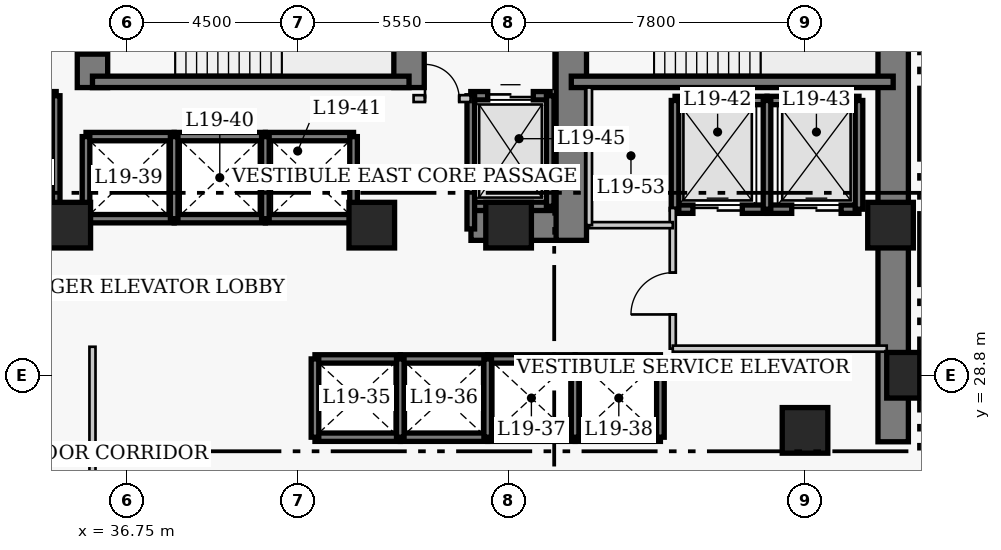
"""IFC4 building model, lengths in metres.
Left out: names, types, materials, properties, quantities, classifications, styles, units other than length and angle.
Written with IfcOpenShell. Run it as: python <this file> out.ifc"""

import sys

from ifc_helpers import new_model, si_unit, direction, frame, frame_2d, origin, origin_2d, place, context, subcontext, project, spatial, rectangle, extrude, element, fill, save


model = new_model("IFC4")
c1 = context("Model", 3, precision=1e-05, world=origin(), true_north=direction((0.0, 1.0)))
c2 = subcontext(c1, "Body", "Model", "MODEL_VIEW")
j1 = project(units=[si_unit("LENGTHUNIT", "METRE"), si_unit("PLANEANGLEUNIT", "RADIAN")], contexts=[c1])
p1 = place(None, origin())
s1 = spatial("IfcSite", under=j1, at=p1, CompositionType="ELEMENT")
p2 = place(p1, origin())
s2 = spatial("IfcBuilding", under=s1, at=p2, CompositionType="ELEMENT")
p3 = place(p2, frame((0.0, 0.0, 80.4)))
s3 = spatial("IfcBuildingStorey", under=s2, at=p3, CompositionType="ELEMENT", Elevation=80.4)
p4 = place(p3, frame((56.92, 27.05, 0.0), z_axis=(0.0, 0.0, 1.0), x_axis=(0.0, 1.0, 0.0)))
e1 = element("IfcWall", 1, at=p4, inside=s3, PredefinedType="SHEAR", context=c2, shape_type="SweptSolid", body=[
    extrude(rectangle(XDim=13.67, YDim=0.8, at=frame_2d((6.835, 0.0))), origin(), (0.0, 0.0, 1.0), 3.8),
])
p5 = place(p3, frame((45.81, 32.75, 0.0), z_axis=(0.0, 0.0, 1.0), x_axis=(1.0, 0.0, 0.0)))
e2 = element("IfcWall", 2, at=p5, inside=s3, PredefinedType="SHEAR", context=c2, shape_type="SweptSolid", body=[
    extrude(rectangle(XDim=2.64, YDim=0.8, at=frame_2d((1.32, 0.0))), origin(), (0.0, 0.0, 1.0), 3.8),
])
p6 = place(p3, frame((35.85, 36.37, 0.0), z_axis=(0.0, 0.0, 1.0), x_axis=(0.0, 1.0, 0.0)))
e3 = element("IfcWall", 3, at=p6, inside=s3, PredefinedType="SHEAR", context=c2, shape_type="SweptSolid", body=[
    extrude(rectangle(XDim=3.95, YDim=0.8, at=frame_2d((1.975, 0.0))), origin(), (0.0, 0.0, 1.0), 3.8),
])
p7 = place(p6, frame((0.88, 0.0, 0.0)))
e4 = element("IfcOpeningElement", 4, at=p7, cuts=e3, PredefinedType="OPENING", context=c2, shape_type="SweptSolid", body=[
    extrude(rectangle(XDim=1.1, YDim=2.15, at=frame_2d((0.55, 1.075))), frame((0.0, 0.41, 0.0), z_axis=(0.0, -1.0, 0.0), x_axis=(1.0, 0.0, 0.0)), (0.0, 0.0, 1.0), 0.82),
])
p8 = place(p3, frame((44.18, 36.37, 0.0), z_axis=(0.0, 0.0, 1.0), x_axis=(0.0, 1.0, 0.0)))
e5 = element("IfcWall", 5, at=p8, inside=s3, PredefinedType="SHEAR", context=c2, shape_type="SweptSolid", body=[
    extrude(rectangle(XDim=3.95, YDim=0.8, at=frame_2d((1.975, 0.0))), origin(), (0.0, 0.0, 1.0), 3.8),
])
p9 = place(p3, frame((48.45, 32.35, 0.0), z_axis=(0.0, 0.0, 1.0), x_axis=(0.0, 1.0, 0.0)))
e6 = element("IfcWall", 6, at=p9, inside=s3, PredefinedType="SHEAR", context=c2, shape_type="SweptSolid", body=[
    extrude(rectangle(XDim=7.97, YDim=0.8, at=frame_2d((3.985, 0.0))), origin(), (0.0, 0.0, 1.0), 3.8),
])
p10 = place(p9, frame((5.85, 0.0, 0.0)))
e7 = element("IfcOpeningElement", 7, at=p10, cuts=e6, PredefinedType="OPENING", context=c2, shape_type="SweptSolid", body=[
    extrude(rectangle(XDim=1.1, YDim=2.15, at=frame_2d((0.55, 1.075))), frame((0.0, 0.41, 0.0), z_axis=(0.0, -1.0, 0.0), x_axis=(1.0, 0.0, 0.0)), (0.0, 0.0, 1.0), 0.82),
])
p11 = place(p3, frame((35.85, 36.52, 0.0), z_axis=(0.0, 0.0, 1.0), x_axis=(1.0, 0.0, 0.0)))
e8 = element("IfcWall", 8, at=p11, inside=s3, PredefinedType="SHEAR", context=c2, shape_type="SweptSolid", body=[
    extrude(rectangle(XDim=8.33, YDim=0.3, at=frame_2d((4.165, 0.0))), origin(), (0.0, 0.0, 1.0), 3.8),
])
p12 = place(p3, frame((48.45, 36.52, 0.0), z_axis=(0.0, 0.0, 1.0), x_axis=(1.0, 0.0, 0.0)))
e9 = element("IfcWall", 9, at=p12, inside=s3, PredefinedType="SHEAR", context=c2, shape_type="SweptSolid", body=[
    extrude(rectangle(XDim=8.47, YDim=0.3, at=frame_2d((4.235, 0.0))), origin(), (0.0, 0.0, 1.0), 3.8),
])
for number, where, z_axis, x_axis in (
    (10, (57.35, 28.8, 0.0), (0.0, 0.0, 1.0), (1.0, 0.0, 0.0)),
    (11, (35.2, 32.75, 0.0), (0.0, 0.0, 1.0), (1.0, 0.0, 0.0)),
    (12, (43.2, 32.75, 0.0), (0.0, 0.0, 1.0), (1.0, 0.0, 0.0)),
    (13, (46.8, 32.75, 0.0), (0.0, 0.0, 1.0), (1.0, 0.0, 0.0)),
    (14, (54.6, 27.35, 0.0), (0.0, 0.0, 1.0), (1.0, 0.0, 0.0)),
    (15, (56.85, 32.75, 0.0), (0.0, 0.0, 1.0), (1.0, 0.0, 0.0)),
):
    element("IfcColumn", number, at=place(p3, frame(where, z_axis=z_axis, x_axis=x_axis)), inside=s3, PredefinedType="COLUMN", context=c2, shape_type="SweptSolid", body=[
        extrude(rectangle(XDim=1.2, YDim=1.2, at=origin_2d()), origin(), (0.0, 0.0, 1.0), 3.8),
    ])
for number, where, z_axis, x_axis in (
    (16, (41.705, 29.23, 0.0), (0.0, 0.0, 1.0), (1.0, 0.0, 0.0)),
    (17, (41.705, 27.17, 0.0), (0.0, 0.0, 1.0), (1.0, 0.0, 0.0)),
):
    element("IfcWall", number, at=place(p3, frame(where, z_axis=z_axis, x_axis=x_axis)), inside=s3, PredefinedType="SHEAR", context=c2, shape_type="SweptSolid", body=[
        extrude(rectangle(XDim=2.245, YDim=0.22, at=frame_2d((1.123, 0.0))), origin(), (0.0, 0.0, 1.0), 3.8),
    ])
p13 = place(p3, frame((41.705, 27.17, 0.0), z_axis=(0.0, 0.0, 1.0), x_axis=(0.0, 1.0, 0.0)))
e18 = element("IfcWall", 18, at=p13, inside=s3, PredefinedType="SHEAR", context=c2, shape_type="SweptSolid", body=[
    extrude(rectangle(XDim=2.06, YDim=0.2, at=frame_2d((1.03, 0.0))), origin(), (0.0, 0.0, 1.0), 3.8),
])
for number, where, z_axis, x_axis in (
    (19, (43.95, 29.23, 0.0), (0.0, 0.0, 1.0), (1.0, 0.0, 0.0)),
    (20, (43.95, 27.17, 0.0), (0.0, 0.0, 1.0), (1.0, 0.0, 0.0)),
):
    element("IfcWall", number, at=place(p3, frame(where, z_axis=z_axis, x_axis=x_axis)), inside=s3, PredefinedType="SHEAR", context=c2, shape_type="SweptSolid", body=[
        extrude(rectangle(XDim=2.3, YDim=0.22, at=frame_2d((1.15, 0.0))), origin(), (0.0, 0.0, 1.0), 3.8),
    ])
p14 = place(p3, frame((43.95, 27.17, 0.0), z_axis=(0.0, 0.0, 1.0), x_axis=(0.0, 1.0, 0.0)))
e21 = element("IfcWall", 21, at=p14, inside=s3, PredefinedType="SHEAR", context=c2, shape_type="SweptSolid", body=[
    extrude(rectangle(XDim=2.06, YDim=0.2, at=frame_2d((1.03, 0.0))), origin(), (0.0, 0.0, 1.0), 3.8),
])
for number, where, z_axis, x_axis in (
    (22, (46.25, 29.23, 0.0), (0.0, 0.0, 1.0), (1.0, 0.0, 0.0)),
    (23, (46.25, 27.17, 0.0), (0.0, 0.0, 1.0), (1.0, 0.0, 0.0)),
):
    element("IfcWall", number, at=place(p3, frame(where, z_axis=z_axis, x_axis=x_axis)), inside=s3, PredefinedType="SHEAR", context=c2, shape_type="SweptSolid", body=[
        extrude(rectangle(XDim=2.3, YDim=0.22, at=frame_2d((1.15, 0.0))), origin(), (0.0, 0.0, 1.0), 3.8),
    ])
p15 = place(p3, frame((46.25, 27.17, 0.0), z_axis=(0.0, 0.0, 1.0), x_axis=(0.0, 1.0, 0.0)))
e24 = element("IfcWall", 24, at=p15, inside=s3, PredefinedType="SHEAR", context=c2, shape_type="SweptSolid", body=[
    extrude(rectangle(XDim=2.06, YDim=0.2, at=frame_2d((1.03, 0.0))), origin(), (0.0, 0.0, 1.0), 3.8),
])
for number, where, z_axis, x_axis in (
    (25, (48.55, 29.23, 0.0), (0.0, 0.0, 1.0), (1.0, 0.0, 0.0)),
    (26, (48.55, 27.17, 0.0), (0.0, 0.0, 1.0), (1.0, 0.0, 0.0)),
):
    element("IfcWall", number, at=place(p3, frame(where, z_axis=z_axis, x_axis=x_axis)), inside=s3, PredefinedType="SHEAR", context=c2, shape_type="SweptSolid", body=[
        extrude(rectangle(XDim=2.245, YDim=0.22, at=frame_2d((1.123, 0.0))), origin(), (0.0, 0.0, 1.0), 3.8),
    ])
for number, where, z_axis, x_axis in (
    (27, (48.55, 27.17, 0.0), (0.0, 0.0, 1.0), (0.0, 1.0, 0.0)),
    (28, (50.795, 27.17, 0.0), (0.0, 0.0, 1.0), (0.0, 1.0, 0.0)),
):
    element("IfcWall", number, at=place(p3, frame(where, z_axis=z_axis, x_axis=x_axis)), inside=s3, PredefinedType="SHEAR", context=c2, shape_type="SweptSolid", body=[
        extrude(rectangle(XDim=2.06, YDim=0.2, at=frame_2d((1.03, 0.0))), origin(), (0.0, 0.0, 1.0), 3.8),
    ])
for number, where, z_axis, x_axis in (
    (29, (35.68, 35.08, 0.0), (0.0, 0.0, 1.0), (1.0, 0.0, 0.0)),
    (30, (35.68, 32.92, 0.0), (0.0, 0.0, 1.0), (1.0, 0.0, 0.0)),
):
    element("IfcWall", number, at=place(p3, frame(where, z_axis=z_axis, x_axis=x_axis)), inside=s3, PredefinedType="SHEAR", context=c2, shape_type="SweptSolid", body=[
        extrude(rectangle(XDim=2.32, YDim=0.22, at=frame_2d((1.16, 0.0))), origin(), (0.0, 0.0, 1.0), 3.8),
    ])
p16 = place(p3, frame((35.68, 32.92, 0.0), z_axis=(0.0, 0.0, 1.0), x_axis=(0.0, 1.0, 0.0)))
e31 = element("IfcWall", 31, at=p16, inside=s3, PredefinedType="SHEAR", context=c2, shape_type="SweptSolid", body=[
    extrude(rectangle(XDim=2.16, YDim=0.2, at=frame_2d((1.08, 0.0))), origin(), (0.0, 0.0, 1.0), 3.8),
])
for number, where, z_axis, x_axis in (
    (32, (38.0, 35.08, 0.0), (0.0, 0.0, 1.0), (1.0, 0.0, 0.0)),
    (33, (38.0, 32.92, 0.0), (0.0, 0.0, 1.0), (1.0, 0.0, 0.0)),
):
    element("IfcWall", number, at=place(p3, frame(where, z_axis=z_axis, x_axis=x_axis)), inside=s3, PredefinedType="SHEAR", context=c2, shape_type="SweptSolid", body=[
        extrude(rectangle(XDim=2.4, YDim=0.22, at=frame_2d((1.2, 0.0))), origin(), (0.0, 0.0, 1.0), 3.8),
    ])
p17 = place(p3, frame((38.0, 32.92, 0.0), z_axis=(0.0, 0.0, 1.0), x_axis=(0.0, 1.0, 0.0)))
e34 = element("IfcWall", 34, at=p17, inside=s3, PredefinedType="SHEAR", context=c2, shape_type="SweptSolid", body=[
    extrude(rectangle(XDim=2.16, YDim=0.2, at=frame_2d((1.08, 0.0))), origin(), (0.0, 0.0, 1.0), 3.8),
])
for number, where, z_axis, x_axis in (
    (35, (40.4, 35.08, 0.0), (0.0, 0.0, 1.0), (1.0, 0.0, 0.0)),
    (36, (40.4, 32.92, 0.0), (0.0, 0.0, 1.0), (1.0, 0.0, 0.0)),
):
    element("IfcWall", number, at=place(p3, frame(where, z_axis=z_axis, x_axis=x_axis)), inside=s3, PredefinedType="SHEAR", context=c2, shape_type="SweptSolid", body=[
        extrude(rectangle(XDim=2.32, YDim=0.22, at=frame_2d((1.16, 0.0))), origin(), (0.0, 0.0, 1.0), 3.8),
    ])
for number, where, z_axis, x_axis in (
    (37, (40.4, 32.92, 0.0), (0.0, 0.0, 1.0), (0.0, 1.0, 0.0)),
    (38, (42.72, 32.92, 0.0), (0.0, 0.0, 1.0), (0.0, 1.0, 0.0)),
):
    element("IfcWall", number, at=place(p3, frame(where, z_axis=z_axis, x_axis=x_axis)), inside=s3, PredefinedType="SHEAR", context=c2, shape_type="SweptSolid", body=[
        extrude(rectangle(XDim=2.16, YDim=0.2, at=frame_2d((1.08, 0.0))), origin(), (0.0, 0.0, 1.0), 3.8),
    ])
p18 = place(p3, frame((51.18, 36.03, 0.0), z_axis=(0.0, 0.0, 1.0), x_axis=(1.0, 0.0, 0.0)))
e39 = element("IfcWall", 39, at=p18, inside=s3, PredefinedType="SHEAR", context=c2, shape_type="SweptSolid", body=[
    extrude(rectangle(XDim=2.42, YDim=0.22, at=frame_2d((1.21, 0.0))), origin(), (0.0, 0.0, 1.0), 3.8),
])
p19 = place(p3, frame((51.18, 33.17, 0.0), z_axis=(0.0, 0.0, 1.0), x_axis=(1.0, 0.0, 0.0)))
e40 = element("IfcWall", 40, at=p19, inside=s3, PredefinedType="SHEAR", context=c2, shape_type="SweptSolid", body=[
    extrude(rectangle(XDim=2.42, YDim=0.22, at=frame_2d((1.21, 0.0))), origin(), (0.0, 0.0, 1.0), 3.8),
])
p20 = place(p19, frame((0.47, 0.0, 0.0)))
e41 = element("IfcOpeningElement", 41, at=p20, cuts=e40, PredefinedType="OPENING", context=c2, shape_type="SweptSolid", body=[
    extrude(rectangle(XDim=1.3, YDim=2.15, at=frame_2d((0.65, 1.075))), frame((0.0, 0.12, 0.0), z_axis=(0.0, -1.0, 0.0), x_axis=(1.0, 0.0, 0.0)), (0.0, 0.0, 1.0), 0.24),
])
p21 = place(p3, frame((51.18, 33.17, 0.0), z_axis=(0.0, 0.0, 1.0), x_axis=(0.0, 1.0, 0.0)))
e42 = element("IfcWall", 42, at=p21, inside=s3, PredefinedType="SHEAR", context=c2, shape_type="SweptSolid", body=[
    extrude(rectangle(XDim=2.86, YDim=0.2, at=frame_2d((1.43, 0.0))), origin(), (0.0, 0.0, 1.0), 3.8),
])
p22 = place(p3, frame((53.6, 36.03, 0.0), z_axis=(0.0, 0.0, 1.0), x_axis=(1.0, 0.0, 0.0)))
e43 = element("IfcWall", 43, at=p22, inside=s3, PredefinedType="SHEAR", context=c2, shape_type="SweptSolid", body=[
    extrude(rectangle(XDim=2.42, YDim=0.22, at=frame_2d((1.21, 0.0))), origin(), (0.0, 0.0, 1.0), 3.8),
])
p23 = place(p3, frame((53.6, 33.17, 0.0), z_axis=(0.0, 0.0, 1.0), x_axis=(1.0, 0.0, 0.0)))
e44 = element("IfcWall", 44, at=p23, inside=s3, PredefinedType="SHEAR", context=c2, shape_type="SweptSolid", body=[
    extrude(rectangle(XDim=2.42, YDim=0.22, at=frame_2d((1.21, 0.0))), origin(), (0.0, 0.0, 1.0), 3.8),
])
p24 = place(p23, frame((0.65, 0.0, 0.0)))
e45 = element("IfcOpeningElement", 45, at=p24, cuts=e44, PredefinedType="OPENING", context=c2, shape_type="SweptSolid", body=[
    extrude(rectangle(XDim=1.3, YDim=2.15, at=frame_2d((0.65, 1.075))), frame((0.0, 0.12, 0.0), z_axis=(0.0, -1.0, 0.0), x_axis=(1.0, 0.0, 0.0)), (0.0, 0.0, 1.0), 0.24),
])
for number, where, z_axis, x_axis in (
    (46, (53.6, 33.17, 0.0), (0.0, 0.0, 1.0), (0.0, 1.0, 0.0)),
    (47, (56.02, 33.17, 0.0), (0.0, 0.0, 1.0), (0.0, 1.0, 0.0)),
):
    element("IfcWall", number, at=place(p3, frame(where, z_axis=z_axis, x_axis=x_axis)), inside=s3, PredefinedType="SHEAR", context=c2, shape_type="SweptSolid", body=[
        extrude(rectangle(XDim=2.86, YDim=0.2, at=frame_2d((1.43, 0.0))), origin(), (0.0, 0.0, 1.0), 3.8),
    ])
p25 = place(p3, frame((32.805, 36.155, 0.0), z_axis=(0.0, 0.0, 1.0), x_axis=(1.0, 0.0, 0.0)))
e48 = element("IfcWall", 48, at=p25, inside=s3, PredefinedType="SHEAR", context=c2, shape_type="SweptSolid", body=[
    extrude(rectangle(XDim=2.09, YDim=0.22, at=frame_2d((1.045, 0.0))), origin(), (0.0, 0.0, 1.0), 3.8),
])
p26 = place(p25, frame((0.445, 0.0, 0.0)))
e49 = element("IfcOpeningElement", 49, at=p26, cuts=e48, PredefinedType="OPENING", context=c2, shape_type="SweptSolid", body=[
    extrude(rectangle(XDim=1.2, YDim=2.15, at=frame_2d((0.6, 1.075))), frame((0.0, 0.12, 0.0), z_axis=(0.0, -1.0, 0.0), x_axis=(1.0, 0.0, 0.0)), (0.0, 0.0, 1.0), 0.24),
])
p27 = place(p3, frame((32.805, 33.245, 0.0), z_axis=(0.0, 0.0, 1.0), x_axis=(1.0, 0.0, 0.0)))
e50 = element("IfcWall", 50, at=p27, inside=s3, PredefinedType="SHEAR", context=c2, shape_type="SweptSolid", body=[
    extrude(rectangle(XDim=2.09, YDim=0.22, at=frame_2d((1.045, 0.0))), origin(), (0.0, 0.0, 1.0), 3.8),
])
p28 = place(p3, frame((34.895, 33.245, 0.0), z_axis=(0.0, 0.0, 1.0), x_axis=(0.0, 1.0, 0.0)))
e51 = element("IfcWall", 51, at=p28, inside=s3, PredefinedType="SHEAR", context=c2, shape_type="SweptSolid", body=[
    extrude(rectangle(XDim=2.91, YDim=0.2, at=frame_2d((1.455, 0.0))), origin(), (0.0, 0.0, 1.0), 3.8),
])
p29 = place(p3, frame((45.805, 36.155, 0.0), z_axis=(0.0, 0.0, 1.0), x_axis=(1.0, 0.0, 0.0)))
e52 = element("IfcWall", 52, at=p29, inside=s3, PredefinedType="SHEAR", context=c2, shape_type="SweptSolid", body=[
    extrude(rectangle(XDim=2.09, YDim=0.22, at=frame_2d((1.045, 0.0))), origin(), (0.0, 0.0, 1.0), 3.8),
])
p30 = place(p29, frame((0.445, 0.0, 0.0)))
e53 = element("IfcOpeningElement", 53, at=p30, cuts=e52, PredefinedType="OPENING", context=c2, shape_type="SweptSolid", body=[
    extrude(rectangle(XDim=1.2, YDim=2.15, at=frame_2d((0.6, 1.075))), frame((0.0, 0.12, 0.0), z_axis=(0.0, -1.0, 0.0), x_axis=(1.0, 0.0, 0.0)), (0.0, 0.0, 1.0), 0.24),
])
p31 = place(p3, frame((45.805, 33.245, 0.0), z_axis=(0.0, 0.0, 1.0), x_axis=(1.0, 0.0, 0.0)))
e54 = element("IfcWall", 54, at=p31, inside=s3, PredefinedType="SHEAR", context=c2, shape_type="SweptSolid", body=[
    extrude(rectangle(XDim=2.09, YDim=0.22, at=frame_2d((1.045, 0.0))), origin(), (0.0, 0.0, 1.0), 3.8),
])
p32 = place(p3, frame((45.805, 32.65, 0.0), z_axis=(0.0, 0.0, 1.0), x_axis=(0.0, 1.0, 0.0)))
e55 = element("IfcWall", 55, at=p32, inside=s3, PredefinedType="SHEAR", context=c2, shape_type="SweptSolid", body=[
    extrude(rectangle(XDim=3.505, YDim=0.2, at=frame_2d((1.752, 0.0))), origin(), (0.0, 0.0, 1.0), 3.8),
])
p33 = place(p3, frame((47.895, 33.245, 0.0), z_axis=(0.0, 0.0, 1.0), x_axis=(0.0, 1.0, 0.0)))
e56 = element("IfcWall", 56, at=p33, inside=s3, PredefinedType="SHEAR", context=c2, shape_type="SweptSolid", body=[
    extrude(rectangle(XDim=2.91, YDim=0.2, at=frame_2d((1.455, 0.0))), origin(), (0.0, 0.0, 1.0), 3.8),
])
p34 = place(p3, frame((44.3, 36.08, 0.0), z_axis=(0.0, 0.0, 1.0), x_axis=(1.0, 0.0, 0.0)))
e57 = element("IfcWall", 57, at=p34, inside=s3, PredefinedType="PARTITIONING", context=c2, shape_type="SweptSolid", body=[
    extrude(rectangle(XDim=1.5, YDim=0.18, at=frame_2d((0.75, 0.0))), origin(), (0.0, 0.0, 1.0), 3.54),
])
p35 = place(p34, frame((0.3, 0.0, 0.0)))
e58 = element("IfcOpeningElement", 58, at=p35, cuts=e57, PredefinedType="OPENING", context=c2, shape_type="SweptSolid", body=[
    extrude(rectangle(XDim=0.9, YDim=2.15, at=frame_2d((0.45, 1.075))), frame((0.0, 0.1, 0.0), z_axis=(0.0, -1.0, 0.0), x_axis=(1.0, 0.0, 0.0)), (0.0, 0.0, 1.0), 0.2),
])
p36 = place(p3, frame((51.12, 29.5, 0.0), z_axis=(0.0, 0.0, 1.0), x_axis=(0.0, 1.0, 0.0)))
e59 = element("IfcWall", 59, at=p36, inside=s3, PredefinedType="PARTITIONING", context=c2, shape_type="SweptSolid", body=[
    extrude(rectangle(XDim=3.7, YDim=0.16, at=frame_2d((1.85, 0.0))), origin(), (0.0, 0.0, 1.0), 3.54),
])
p37 = place(p36, frame((0.9, 0.0, 0.0)))
e60 = element("IfcOpeningElement", 60, at=p37, cuts=e59, PredefinedType="OPENING", context=c2, shape_type="SweptSolid", body=[
    extrude(rectangle(XDim=1.1, YDim=2.15, at=frame_2d((0.55, 1.075))), frame((0.0, 0.09, 0.0), z_axis=(0.0, -1.0, 0.0), x_axis=(1.0, 0.0, 0.0)), (0.0, 0.0, 1.0), 0.18),
])
p38 = place(p3, frame((51.12, 29.5, 0.0), z_axis=(0.0, 0.0, 1.0), x_axis=(1.0, 0.0, 0.0)))
e61 = element("IfcWall", 61, at=p38, inside=s3, PredefinedType="PARTITIONING", context=c2, shape_type="SweptSolid", body=[
    extrude(rectangle(XDim=5.63, YDim=0.16, at=frame_2d((2.815, 0.0))), origin(), (0.0, 0.0, 1.0), 3.54),
])
p39 = place(p3, frame((48.92, 32.75, 0.0), z_axis=(0.0, 0.0, 1.0), x_axis=(1.0, 0.0, 0.0)))
e62 = element("IfcWall", 62, at=p39, inside=s3, PredefinedType="PARTITIONING", context=c2, shape_type="SweptSolid", body=[
    extrude(rectangle(XDim=2.2, YDim=0.16, at=frame_2d((1.1, 0.0))), origin(), (0.0, 0.0, 1.0), 3.54),
])
p40 = place(p3, frame((48.92, 32.75, 0.0), z_axis=(0.0, 0.0, 1.0), x_axis=(0.0, 1.0, 0.0)))
e63 = element("IfcWall", 63, at=p40, inside=s3, PredefinedType="PARTITIONING", context=c2, shape_type="SweptSolid", body=[
    extrude(rectangle(XDim=3.62, YDim=0.15, at=frame_2d((1.81, 0.0))), origin(), (0.0, 0.0, 1.0), 3.54),
])
p41 = place(p3, frame((35.85, 26.11, 0.0), z_axis=(0.0, 0.0, 1.0), x_axis=(0.0, 1.0, 0.0)))
e64 = element("IfcWall", 64, at=p41, inside=s3, PredefinedType="PARTITIONING", context=c2, shape_type="SweptSolid", body=[
    extrude(rectangle(XDim=3.44, YDim=0.16, at=frame_2d((1.72, 0.0))), origin(), (0.0, 0.0, 1.0), 3.54),
])
p42 = place(p20, origin())
e65 = element("IfcDoor", 65, at=p42, inside=s3, OperationType="DOUBLE_DOOR_SLIDING", PredefinedType="DOOR", context=c2, shape_type="SweptSolid", body=[
    extrude(rectangle(XDim=1.3, YDim=2.15, at=frame_2d((0.65, 1.075))), frame((0.0, 0.025, 0.0), z_axis=(0.0, -1.0, 0.0), x_axis=(1.0, 0.0, 0.0)), (0.0, 0.0, 1.0), 0.05),
])
fill(e41, e65)
p43 = place(p24, origin())
e66 = element("IfcDoor", 66, at=p43, inside=s3, OperationType="DOUBLE_DOOR_SLIDING", PredefinedType="DOOR", context=c2, shape_type="SweptSolid", body=[
    extrude(rectangle(XDim=1.3, YDim=2.15, at=frame_2d((0.65, 1.075))), frame((0.0, 0.025, 0.0), z_axis=(0.0, -1.0, 0.0), x_axis=(1.0, 0.0, 0.0)), (0.0, 0.0, 1.0), 0.05),
])
fill(e45, e66)
p44 = place(p30, origin())
e67 = element("IfcDoor", 67, at=p44, inside=s3, OperationType="DOUBLE_DOOR_SLIDING", PredefinedType="DOOR", context=c2, shape_type="SweptSolid", body=[
    extrude(rectangle(XDim=1.2, YDim=2.15, at=frame_2d((0.6, 1.075))), frame((0.0, 0.025, 0.0), z_axis=(0.0, -1.0, 0.0), x_axis=(1.0, 0.0, 0.0)), (0.0, 0.0, 1.0), 0.05),
])
fill(e53, e67)
p45 = place(p35, origin())
e68 = element("IfcDoor", 68, at=p45, inside=s3, OperationType="SINGLE_SWING_LEFT", PredefinedType="DOOR", context=c2, shape_type="SweptSolid", body=[
    extrude(rectangle(XDim=0.9, YDim=2.15, at=frame_2d((0.45, 1.075))), frame((0.0, 0.025, 0.0), z_axis=(0.0, -1.0, 0.0), x_axis=(1.0, 0.0, 0.0)), (0.0, 0.0, 1.0), 0.05),
])
fill(e58, e68)
p46 = place(p37, origin())
e69 = element("IfcDoor", 69, at=p46, inside=s3, OperationType="SINGLE_SWING_LEFT", PredefinedType="DOOR", context=c2, shape_type="SweptSolid", body=[
    extrude(rectangle(XDim=1.1, YDim=2.15, at=frame_2d((0.55, 1.075))), frame((0.0, 0.025, 0.0), z_axis=(0.0, -1.0, 0.0), x_axis=(1.0, 0.0, 0.0)), (0.0, 0.0, 1.0), 0.05),
])
fill(e60, e69)
p47 = place(p7, origin())
e70 = element("IfcDoor", 70, at=p47, inside=s3, OperationType="SINGLE_SWING_RIGHT", PredefinedType="DOOR", context=c2, shape_type="SweptSolid", body=[
    extrude(rectangle(XDim=1.1, YDim=2.15, at=frame_2d((0.55, 1.075))), frame((0.0, 0.025, 0.0), z_axis=(0.0, -1.0, 0.0), x_axis=(1.0, 0.0, 0.0)), (0.0, 0.0, 1.0), 0.05),
])
fill(e4, e70)
save(model, sys.argv[1])
